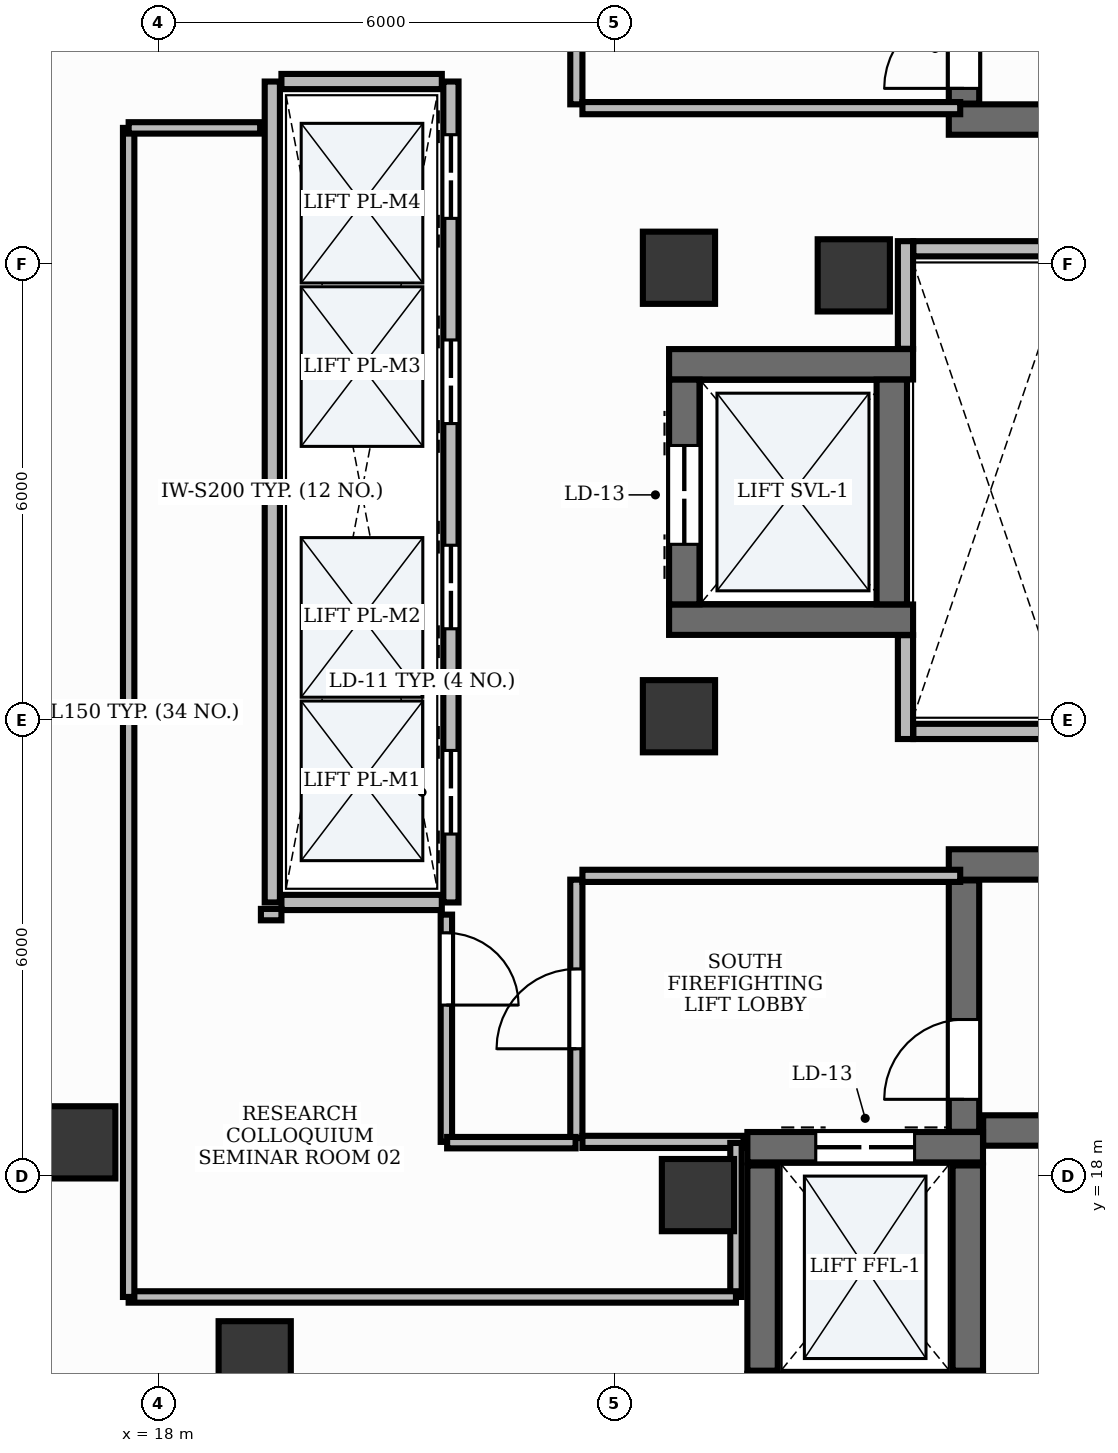
"""IFC4 building model, lengths in metres.
Left out: names, types, materials, properties, quantities, classifications, styles, units other than length and angle.
Written with IfcOpenShell. Run it as: python <this file> out.ifc"""

import sys

from ifc_helpers import new_model, si_unit, direction, frame, frame_2d, origin, origin_2d, place, context, subcontext, project, spatial, rectangle, extrude, element, fill, save


model = new_model("IFC4")
c1 = context("Model", 3, precision=1e-05, world=origin(), true_north=direction((0.0, 1.0)))
c2 = subcontext(c1, "Body", "Model", "MODEL_VIEW")
j1 = project(units=[si_unit("LENGTHUNIT", "METRE"), si_unit("PLANEANGLEUNIT", "RADIAN")], contexts=[c1])
p1 = place(None, origin())
s1 = spatial("IfcSite", under=j1, at=p1, CompositionType="ELEMENT")
p2 = place(p1, origin())
s2 = spatial("IfcBuilding", under=s1, at=p2, CompositionType="ELEMENT")
p3 = place(p2, frame((0.0, 0.0, 226.8)))
s3 = spatial("IfcBuildingStorey", under=s2, at=p3, CompositionType="ELEMENT", Elevation=226.8)
p4 = place(p3, frame((28.4, 31.9, 0.0), z_axis=(0.0, 0.0, 1.0), x_axis=(1.0, 0.0, 0.0)))
e1 = element("IfcWall", 1, at=p4, inside=s3, PredefinedType="SHEAR", context=c2, shape_type="SweptSolid", body=[
    extrude(rectangle(XDim=8.65, YDim=0.4, at=frame_2d((4.325, 0.0))), origin(), (0.0, 0.0, 1.0), 3.9),
])
p5 = place(p3, frame((28.6, 32.11, 0.0), z_axis=(0.0, 0.0, 1.0), x_axis=(0.0, 1.0, 0.0)))
e2 = element("IfcWall", 2, at=p5, inside=s3, PredefinedType="SHEAR", context=c2, shape_type="SweptSolid", body=[
    extrude(rectangle(XDim=3.308, YDim=0.4, at=frame_2d((1.654, 0.0))), origin(), (0.0, 0.0, 1.0), 3.9),
])
p6 = place(p5, frame((0.2, 0.0, 0.0)))
e3 = element("IfcOpeningElement", 3, at=p6, cuts=e2, PredefinedType="OPENING", context=c2, shape_type="SweptSolid", body=[
    extrude(rectangle(XDim=1.05, YDim=2.15, at=frame_2d((0.525, 1.075))), frame((0.0, 0.215, 0.0), z_axis=(0.0, -1.0, 0.0), x_axis=(1.0, 0.0, 0.0)), (0.0, 0.0, 1.0), 0.43),
])
p7 = place(p3, frame((28.852, 18.6, 0.0), z_axis=(0.0, 0.0, 1.0), x_axis=(1.0, 0.0, 0.0)))
e4 = element("IfcWall", 4, at=p7, inside=s3, PredefinedType="SHEAR", context=c2, shape_type="SweptSolid", body=[
    extrude(rectangle(XDim=8.198, YDim=0.4, at=frame_2d((4.099, 0.0))), origin(), (0.0, 0.0, 1.0), 3.9),
])
p8 = place(p3, frame((28.4, 22.1, 0.0), z_axis=(0.0, 0.0, 1.0), x_axis=(1.0, 0.0, 0.0)))
e5 = element("IfcWall", 5, at=p8, inside=s3, PredefinedType="SHEAR", context=c2, shape_type="SweptSolid", body=[
    extrude(rectangle(XDim=8.65, YDim=0.4, at=frame_2d((4.325, 0.0))), origin(), (0.0, 0.0, 1.0), 3.9),
])
p9 = place(p3, frame((28.6, 18.582, 0.0), z_axis=(0.0, 0.0, 1.0), x_axis=(0.0, 1.0, 0.0)))
e6 = element("IfcWall", 6, at=p9, inside=s3, PredefinedType="SHEAR", context=c2, shape_type="SweptSolid", body=[
    extrude(rectangle(XDim=3.308, YDim=0.4, at=frame_2d((1.654, 0.0))), origin(), (0.0, 0.0, 1.0), 3.9),
])
p10 = place(p9, frame((0.428, 0.0, 0.0)))
e7 = element("IfcOpeningElement", 7, at=p10, cuts=e6, PredefinedType="OPENING", context=c2, shape_type="SweptSolid", body=[
    extrude(rectangle(XDim=1.05, YDim=2.15, at=frame_2d((0.525, 1.075))), frame((0.0, 0.215, 0.0), z_axis=(0.0, -1.0, 0.0), x_axis=(1.0, 0.0, 0.0)), (0.0, 0.0, 1.0), 0.43),
])
p11 = place(p3, frame((25.75, 18.38, 0.0), z_axis=(0.0, 0.0, 1.0), x_axis=(1.0, 0.0, 0.0)))
e8 = element("IfcWall", 8, at=p11, inside=s3, PredefinedType="SHEAR", context=c2, shape_type="SweptSolid", body=[
    extrude(rectangle(XDim=3.1, YDim=0.4, at=frame_2d((1.55, 0.0))), origin(), (0.0, 0.0, 1.0), 3.9),
])
p12 = place(p11, frame((0.9, 0.0, 0.0)))
e9 = element("IfcOpeningElement", 9, at=p12, cuts=e8, PredefinedType="OPENING", context=c2, shape_type="SweptSolid", body=[
    extrude(rectangle(XDim=1.3, YDim=2.2, at=frame_2d((0.65, 1.1))), frame((0.0, 0.215, 0.0), z_axis=(0.0, -1.0, 0.0), x_axis=(1.0, 0.0, 0.0)), (0.0, 0.0, 1.0), 0.43),
])
for number, where, z_axis, x_axis in (
    (10, (25.95, 15.44, 0.0), (0.0, 0.0, 1.0), (0.0, 1.0, 0.0)),
    (11, (28.65, 15.44, 0.0), (0.0, 0.0, 1.0), (0.0, 1.0, 0.0)),
):
    element("IfcWall", number, at=place(p3, frame(where, z_axis=z_axis, x_axis=x_axis)), inside=s3, PredefinedType="SHEAR", context=c2, shape_type="SweptSolid", body=[
        extrude(rectangle(XDim=2.7, YDim=0.4, at=frame_2d((1.35, 0.0))), origin(), (0.0, 0.0, 1.0), 3.9),
    ])
for number, where, z_axis, x_axis in (
    (12, (24.72, 28.68, 0.0), (0.0, 0.0, 1.0), (1.0, 0.0, 0.0)),
    (13, (24.72, 25.32, 0.0), (0.0, 0.0, 1.0), (1.0, 0.0, 0.0)),
):
    element("IfcWall", number, at=place(p3, frame(where, z_axis=z_axis, x_axis=x_axis)), inside=s3, PredefinedType="SHEAR", context=c2, shape_type="SweptSolid", body=[
        extrude(rectangle(XDim=3.21, YDim=0.4, at=frame_2d((1.605, 0.0))), origin(), (0.0, 0.0, 1.0), 3.9),
    ])
p13 = place(p3, frame((24.92, 25.522, 0.0), z_axis=(0.0, 0.0, 1.0), x_axis=(0.0, 1.0, 0.0)))
e14 = element("IfcWall", 14, at=p13, inside=s3, PredefinedType="SHEAR", context=c2, shape_type="SweptSolid", body=[
    extrude(rectangle(XDim=2.956, YDim=0.4, at=frame_2d((1.478, 0.0))), origin(), (0.0, 0.0, 1.0), 3.9),
])
p14 = place(p13, frame((0.79, 0.0, 0.0)))
e15 = element("IfcOpeningElement", 15, at=p14, cuts=e14, PredefinedType="OPENING", context=c2, shape_type="SweptSolid", body=[
    extrude(rectangle(XDim=1.3, YDim=2.2, at=frame_2d((0.65, 1.1))), frame((0.0, 0.215, 0.0), z_axis=(0.0, -1.0, 0.0), x_axis=(1.0, 0.0, 0.0)), (0.0, 0.0, 1.0), 0.43),
])
p15 = place(p3, frame((27.65, 25.522, 0.0), z_axis=(0.0, 0.0, 1.0), x_axis=(0.0, 1.0, 0.0)))
e16 = element("IfcWall", 16, at=p15, inside=s3, PredefinedType="SHEAR", context=c2, shape_type="SweptSolid", body=[
    extrude(rectangle(XDim=2.956, YDim=0.4, at=frame_2d((1.478, 0.0))), origin(), (0.0, 0.0, 1.0), 3.9),
])
for number, where, z_axis, x_axis in (
    (17, (24.85, 29.95, -0.0), (0.0, 0.0, 1.0), (1.0, 0.0, 0.0)),
    (18, (27.15, 29.85, -0.0), (0.0, 0.0, 1.0), (1.0, 0.0, 0.0)),
    (19, (24.85, 24.05, -0.0), (0.0, 0.0, 1.0), (1.0, 0.0, 0.0)),
    (20, (25.1, 17.75, -0.0), (0.0, 0.0, 1.0), (1.0, 0.0, 0.0)),
):
    element("IfcColumn", number, at=place(p3, frame(where, z_axis=z_axis, x_axis=x_axis)), inside=s3, PredefinedType="PILASTER", context=c2, shape_type="SweptSolid", body=[
        extrude(rectangle(XDim=0.95, YDim=0.95, at=origin_2d()), origin(), (0.0, 0.0, 1.0), 3.901),
    ])
for number, where, z_axis, x_axis in (
    (21, (16.96, 18.444, -0.0), (0.0, 0.0, 1.0), (1.0, 0.0, 0.0)),
    (22, (19.268, 15.616, -0.0), (0.0, 0.0, 1.0), (1.0, 0.0, 0.0)),
):
    element("IfcColumn", number, at=place(p3, frame(where, z_axis=z_axis, x_axis=x_axis)), inside=s3, PredefinedType="COLUMN", context=c2, shape_type="SweptSolid", body=[
        extrude(rectangle(XDim=0.95, YDim=0.95, at=origin_2d()), origin(), (0.0, 0.0, 1.0), 3.901),
    ])
p16 = place(p3, frame((19.5, 21.6, 0.0), z_axis=(0.0, 0.0, 1.0), x_axis=(0.0, 1.0, 0.0)))
e23 = element("IfcWall", 23, at=p16, inside=s3, PredefinedType="PARTITIONING", context=c2, shape_type="SweptSolid", body=[
    extrude(rectangle(XDim=10.8, YDim=0.2, at=frame_2d((5.4, 0.0))), origin(), (0.0, 0.0, 1.0), 2.91),
])
p17 = place(p3, frame((21.85, 21.6, 0.0), z_axis=(0.0, 0.0, 1.0), x_axis=(0.0, 1.0, 0.0)))
e24 = element("IfcWall", 24, at=p17, inside=s3, PredefinedType="PARTITIONING", context=c2, shape_type="SweptSolid", body=[
    extrude(rectangle(XDim=10.8, YDim=0.2, at=frame_2d((5.4, 0.0))), origin(), (0.0, 0.0, 1.0), 2.91),
])
p18 = place(p17, frame((0.9, 0.0, 0.0)))
e25 = element("IfcOpeningElement", 25, at=p18, cuts=e24, PredefinedType="OPENING", context=c2, shape_type="SweptSolid", body=[
    extrude(rectangle(XDim=1.1, YDim=2.2, at=frame_2d((0.55, 1.1))), frame((0.0, 0.115, 0.0), z_axis=(0.0, -1.0, 0.0), x_axis=(1.0, 0.0, 0.0)), (0.0, 0.0, 1.0), 0.23),
])
p19 = place(p17, frame((3.6, 0.0, 0.0)))
e26 = element("IfcOpeningElement", 26, at=p19, cuts=e24, PredefinedType="OPENING", context=c2, shape_type="SweptSolid", body=[
    extrude(rectangle(XDim=1.1, YDim=2.2, at=frame_2d((0.55, 1.1))), frame((0.0, 0.115, 0.0), z_axis=(0.0, -1.0, 0.0), x_axis=(1.0, 0.0, 0.0)), (0.0, 0.0, 1.0), 0.23),
])
p20 = place(p17, frame((6.3, 0.0, 0.0)))
e27 = element("IfcOpeningElement", 27, at=p20, cuts=e24, PredefinedType="OPENING", context=c2, shape_type="SweptSolid", body=[
    extrude(rectangle(XDim=1.1, YDim=2.2, at=frame_2d((0.55, 1.1))), frame((0.0, 0.115, 0.0), z_axis=(0.0, -1.0, 0.0), x_axis=(1.0, 0.0, 0.0)), (0.0, 0.0, 1.0), 0.23),
])
p21 = place(p17, frame((9.0, 0.0, 0.0)))
e28 = element("IfcOpeningElement", 28, at=p21, cuts=e24, PredefinedType="OPENING", context=c2, shape_type="SweptSolid", body=[
    extrude(rectangle(XDim=1.1, YDim=2.2, at=frame_2d((0.55, 1.1))), frame((0.0, 0.115, 0.0), z_axis=(0.0, -1.0, 0.0), x_axis=(1.0, 0.0, 0.0)), (0.0, 0.0, 1.0), 0.23),
])
for number, where, z_axis, x_axis in (
    (29, (19.62, 21.6, 0.0), (0.0, 0.0, 1.0), (1.0, 0.0, 0.0)),
    (30, (19.62, 32.4, 0.0), (0.0, 0.0, 1.0), (1.0, 0.0, 0.0)),
):
    element("IfcWall", number, at=place(p3, frame(where, z_axis=z_axis, x_axis=x_axis)), inside=s3, PredefinedType="PARTITIONING", context=c2, shape_type="SweptSolid", body=[
        extrude(rectangle(XDim=2.11, YDim=0.2, at=frame_2d((1.055, 0.0))), origin(), (0.0, 0.0, 1.0), 2.91),
    ])
p22 = place(p3, frame((27.83, 23.75, 0.0), z_axis=(0.0, 0.0, 1.0), x_axis=(0.0, 1.0, 0.0)))
e31 = element("IfcWall", 31, at=p22, inside=s3, PredefinedType="PARTITIONING", context=c2, shape_type="SweptSolid", body=[
    extrude(rectangle(XDim=1.366, YDim=0.2, at=frame_2d((0.683, 0.0))), origin(), (0.0, 0.0, 1.0), 2.91),
])
p23 = place(p3, frame((27.83, 28.884, 0.0), z_axis=(0.0, 0.0, 1.0), x_axis=(0.0, 1.0, 0.0)))
e32 = element("IfcWall", 32, at=p23, inside=s3, PredefinedType="PARTITIONING", context=c2, shape_type="SweptSolid", body=[
    extrude(rectangle(XDim=1.416, YDim=0.2, at=frame_2d((0.708, 0.0))), origin(), (0.0, 0.0, 1.0), 2.91),
])
for number, where, z_axis, x_axis in (
    (33, (27.934, 23.85, 0.0), (0.0, 0.0, 1.0), (1.0, 0.0, 0.0)),
    (34, (27.934, 30.2, 0.0), (0.0, 0.0, 1.0), (1.0, 0.0, 0.0)),
):
    element("IfcWall", number, at=place(p3, frame(where, z_axis=z_axis, x_axis=x_axis)), inside=s3, PredefinedType="PARTITIONING", context=c2, shape_type="SweptSolid", body=[
        extrude(rectangle(XDim=2.096, YDim=0.2, at=frame_2d((1.048, 0.0))), origin(), (0.0, 0.0, 1.0), 2.91),
    ])
p24 = place(p3, frame((23.5, 32.1, 0.0), z_axis=(0.0, 0.0, 1.0), x_axis=(0.0, 1.0, 0.0)))
e35 = element("IfcWall", 35, at=p24, inside=s3, PredefinedType="PARTITIONING", context=c2, shape_type="SweptSolid", body=[
    extrude(rectangle(XDim=3.4, YDim=0.16, at=frame_2d((1.7, 0.0))), origin(), (0.0, 0.0, 1.0), 2.91),
])
p25 = place(p24, frame((1.175, 0.0, 0.0)))
e36 = element("IfcOpeningElement", 36, at=p25, cuts=e35, PredefinedType="OPENING", context=c2, shape_type="SweptSolid", body=[
    extrude(rectangle(XDim=1.05, YDim=2.15, at=frame_2d((0.525, 1.075))), frame((0.0, 0.095, 0.0), z_axis=(0.0, -1.0, 0.0), x_axis=(1.0, 0.0, 0.0)), (0.0, 0.0, 1.0), 0.19),
])
p26 = place(p3, frame((23.5, 18.5, 0.0), z_axis=(0.0, 0.0, 1.0), x_axis=(0.0, 1.0, 0.0)))
e37 = element("IfcWall", 37, at=p26, inside=s3, PredefinedType="PARTITIONING", context=c2, shape_type="SweptSolid", body=[
    extrude(rectangle(XDim=3.4, YDim=0.16, at=frame_2d((1.7, 0.0))), origin(), (0.0, 0.0, 1.0), 2.91),
])
p27 = place(p26, frame((1.175, 0.0, 0.0)))
e38 = element("IfcOpeningElement", 38, at=p27, cuts=e37, PredefinedType="OPENING", context=c2, shape_type="SweptSolid", body=[
    extrude(rectangle(XDim=1.05, YDim=2.15, at=frame_2d((0.525, 1.075))), frame((0.0, 0.095, 0.0), z_axis=(0.0, -1.0, 0.0), x_axis=(1.0, 0.0, 0.0)), (0.0, 0.0, 1.0), 0.19),
])
for number, where, z_axis, x_axis in (
    (39, (23.58, 32.05, 0.0), (0.0, 0.0, 1.0), (1.0, 0.0, 0.0)),
    (40, (23.58, 21.95, 0.0), (0.0, 0.0, 1.0), (1.0, 0.0, 0.0)),
):
    element("IfcWall", number, at=place(p3, frame(where, z_axis=z_axis, x_axis=x_axis)), inside=s3, PredefinedType="PARTITIONING", context=c2, shape_type="SweptSolid", body=[
        extrude(rectangle(XDim=4.97, YDim=0.16, at=frame_2d((2.485, 0.0))), origin(), (0.0, 0.0, 1.0), 2.91),
    ])
p28 = place(p3, frame((23.58, 18.45, 0.0), z_axis=(0.0, 0.0, 1.0), x_axis=(1.0, 0.0, 0.0)))
e41 = element("IfcWall", 41, at=p28, inside=s3, PredefinedType="PARTITIONING", context=c2, shape_type="SweptSolid", body=[
    extrude(rectangle(XDim=2.12, YDim=0.16, at=frame_2d((1.06, 0.0))), origin(), (0.0, 0.0, 1.0), 2.91),
])
p29 = place(p3, frame((21.79, 21.44, 0.0), z_axis=(0.0, 0.0, 1.0), x_axis=(0.0, -1.0, 0.0)))
e42 = element("IfcWall", 42, at=p29, inside=s3, PredefinedType="PARTITIONING", context=c2, shape_type="SweptSolid", body=[
    extrude(rectangle(XDim=2.99, YDim=0.15, at=frame_2d((1.495, 0.0))), origin(), (0.0, 0.0, 1.0), 2.91),
])
p30 = place(p29, frame((0.24, 0.0, 0.0)))
e43 = element("IfcOpeningElement", 43, at=p30, cuts=e42, PredefinedType="OPENING", context=c2, shape_type="SweptSolid", body=[
    extrude(rectangle(XDim=0.95, YDim=2.15, at=frame_2d((0.475, 1.075))), frame((0.0, 0.09, 0.0), z_axis=(0.0, -1.0, 0.0), x_axis=(1.0, 0.0, 0.0)), (0.0, 0.0, 1.0), 0.18),
])
p31 = place(p3, frame((19.35, 21.44, 0.0), z_axis=(0.0, 0.0, 1.0), x_axis=(1.0, 0.0, 0.0)))
e44 = element("IfcWall", 44, at=p31, inside=s3, PredefinedType="PARTITIONING", context=c2, shape_type="SweptSolid", body=[
    extrude(rectangle(XDim=0.27, YDim=0.15, at=frame_2d((0.135, 0.0))), origin(), (0.0, 0.0, 1.0), 2.91),
])
p32 = place(p3, frame((21.8, 18.44, 0.0), z_axis=(0.0, 0.0, 1.0), x_axis=(1.0, 0.0, 0.0)))
e45 = element("IfcWall", 45, at=p32, inside=s3, PredefinedType="PARTITIONING", context=c2, shape_type="SweptSolid", body=[
    extrude(rectangle(XDim=1.69, YDim=0.15, at=frame_2d((0.845, 0.0))), origin(), (0.0, 0.0, 1.0), 2.91),
])
p33 = place(p3, frame((25.6, 18.436, 0.0), z_axis=(0.0, 0.0, 1.0), x_axis=(0.0, -1.0, 0.0)))
e46 = element("IfcWall", 46, at=p33, inside=s3, PredefinedType="PARTITIONING", context=c2, shape_type="SweptSolid", body=[
    extrude(rectangle(XDim=2.026, YDim=0.15, at=frame_2d((1.013, 0.0))), origin(), (0.0, 0.0, 1.0), 2.91),
])
p34 = place(p3, frame((25.6, 16.41, 0.0), z_axis=(0.0, 0.0, 1.0), x_axis=(-1.0, 0.0, 0.0)))
e47 = element("IfcWall", 47, at=p34, inside=s3, PredefinedType="PARTITIONING", context=c2, shape_type="SweptSolid", body=[
    extrude(rectangle(XDim=7.99, YDim=0.15, at=frame_2d((3.995, 0.0))), origin(), (0.0, 0.0, 1.0), 2.91),
])
p35 = place(p3, frame((17.61, 16.41, 0.0), z_axis=(0.0, 0.0, 1.0), x_axis=(0.0, 1.0, 0.0)))
e48 = element("IfcWall", 48, at=p35, inside=s3, PredefinedType="PARTITIONING", context=c2, shape_type="SweptSolid", body=[
    extrude(rectangle(XDim=15.38, YDim=0.15, at=frame_2d((7.69, 0.0))), origin(), (0.0, 0.0, 1.0), 2.91),
])
p36 = place(p3, frame((17.61, 31.79, 0.0), z_axis=(0.0, 0.0, 1.0), x_axis=(1.0, 0.0, 0.0)))
e49 = element("IfcWall", 49, at=p36, inside=s3, PredefinedType="PARTITIONING", context=c2, shape_type="SweptSolid", body=[
    extrude(rectangle(XDim=1.73, YDim=0.15, at=frame_2d((0.865, 0.0))), origin(), (0.0, 0.0, 1.0), 2.91),
])
p37 = place(p6, origin())
e50 = element("IfcDoor", 50, at=p37, inside=s3, OperationType="SINGLE_SWING_LEFT", PredefinedType="DOOR", context=c2, shape_type="SweptSolid", body=[
    extrude(rectangle(XDim=1.05, YDim=2.15, at=frame_2d((0.525, 1.075))), frame((0.0, 0.025, 0.0), z_axis=(0.0, -1.0, 0.0), x_axis=(1.0, 0.0, 0.0)), (0.0, 0.0, 1.0), 0.05),
])
fill(e3, e50)
p38 = place(p10, origin())
e51 = element("IfcDoor", 51, at=p38, inside=s3, OperationType="SINGLE_SWING_LEFT", PredefinedType="DOOR", context=c2, shape_type="SweptSolid", body=[
    extrude(rectangle(XDim=1.05, YDim=2.15, at=frame_2d((0.525, 1.075))), frame((0.0, 0.025, 0.0), z_axis=(0.0, -1.0, 0.0), x_axis=(1.0, 0.0, 0.0)), (0.0, 0.0, 1.0), 0.05),
])
fill(e7, e51)
p39 = place(p18, origin())
e52 = element("IfcDoor", 52, at=p39, inside=s3, OperationType="DOUBLE_DOOR_SLIDING", PredefinedType="DOOR", context=c2, shape_type="SweptSolid", body=[
    extrude(rectangle(XDim=1.1, YDim=2.2, at=frame_2d((0.55, 1.1))), frame((0.0, 0.025, 0.0), z_axis=(0.0, -1.0, 0.0), x_axis=(1.0, 0.0, 0.0)), (0.0, 0.0, 1.0), 0.05),
])
fill(e25, e52)
p40 = place(p19, origin())
e53 = element("IfcDoor", 53, at=p40, inside=s3, OperationType="DOUBLE_DOOR_SLIDING", PredefinedType="DOOR", context=c2, shape_type="SweptSolid", body=[
    extrude(rectangle(XDim=1.1, YDim=2.2, at=frame_2d((0.55, 1.1))), frame((0.0, 0.025, 0.0), z_axis=(0.0, -1.0, 0.0), x_axis=(1.0, 0.0, 0.0)), (0.0, 0.0, 1.0), 0.05),
])
fill(e26, e53)
p41 = place(p20, origin())
e54 = element("IfcDoor", 54, at=p41, inside=s3, OperationType="DOUBLE_DOOR_SLIDING", PredefinedType="DOOR", context=c2, shape_type="SweptSolid", body=[
    extrude(rectangle(XDim=1.1, YDim=2.2, at=frame_2d((0.55, 1.1))), frame((0.0, 0.025, 0.0), z_axis=(0.0, -1.0, 0.0), x_axis=(1.0, 0.0, 0.0)), (0.0, 0.0, 1.0), 0.05),
])
fill(e27, e54)
p42 = place(p21, origin())
e55 = element("IfcDoor", 55, at=p42, inside=s3, OperationType="DOUBLE_DOOR_SLIDING", PredefinedType="DOOR", context=c2, shape_type="SweptSolid", body=[
    extrude(rectangle(XDim=1.1, YDim=2.2, at=frame_2d((0.55, 1.1))), frame((0.0, 0.025, 0.0), z_axis=(0.0, -1.0, 0.0), x_axis=(1.0, 0.0, 0.0)), (0.0, 0.0, 1.0), 0.05),
])
fill(e28, e55)
p43 = place(p12, origin())
e56 = element("IfcDoor", 56, at=p43, inside=s3, OperationType="DOUBLE_DOOR_SLIDING", PredefinedType="DOOR", context=c2, shape_type="SweptSolid", body=[
    extrude(rectangle(XDim=1.3, YDim=2.2, at=frame_2d((0.65, 1.1))), frame((0.0, 0.025, 0.0), z_axis=(0.0, -1.0, 0.0), x_axis=(1.0, 0.0, 0.0)), (0.0, 0.0, 1.0), 0.05),
])
fill(e9, e56)
p44 = place(p14, origin())
e57 = element("IfcDoor", 57, at=p44, inside=s3, OperationType="DOUBLE_DOOR_SLIDING", PredefinedType="DOOR", context=c2, shape_type="SweptSolid", body=[
    extrude(rectangle(XDim=1.3, YDim=2.2, at=frame_2d((0.65, 1.1))), frame((0.0, 0.025, 0.0), z_axis=(0.0, -1.0, 0.0), x_axis=(1.0, 0.0, 0.0)), (0.0, 0.0, 1.0), 0.05),
])
fill(e15, e57)
p45 = place(p27, origin())
e58 = element("IfcDoor", 58, at=p45, inside=s3, OperationType="SINGLE_SWING_LEFT", PredefinedType="DOOR", context=c2, shape_type="SweptSolid", body=[
    extrude(rectangle(XDim=1.05, YDim=2.15, at=frame_2d((0.525, 1.075))), frame((0.0, 0.025, 0.0), z_axis=(0.0, -1.0, 0.0), x_axis=(1.0, 0.0, 0.0)), (0.0, 0.0, 1.0), 0.05),
])
fill(e38, e58)
p46 = place(p30, origin())
e59 = element("IfcDoor", 59, at=p46, inside=s3, OperationType="SINGLE_SWING_RIGHT", PredefinedType="DOOR", context=c2, shape_type="SweptSolid", body=[
    extrude(rectangle(XDim=0.95, YDim=2.15, at=frame_2d((0.475, 1.075))), frame((0.0, 0.025, 0.0), z_axis=(0.0, -1.0, 0.0), x_axis=(1.0, 0.0, 0.0)), (0.0, 0.0, 1.0), 0.05),
])
fill(e43, e59)
save(model, sys.argv[1])
